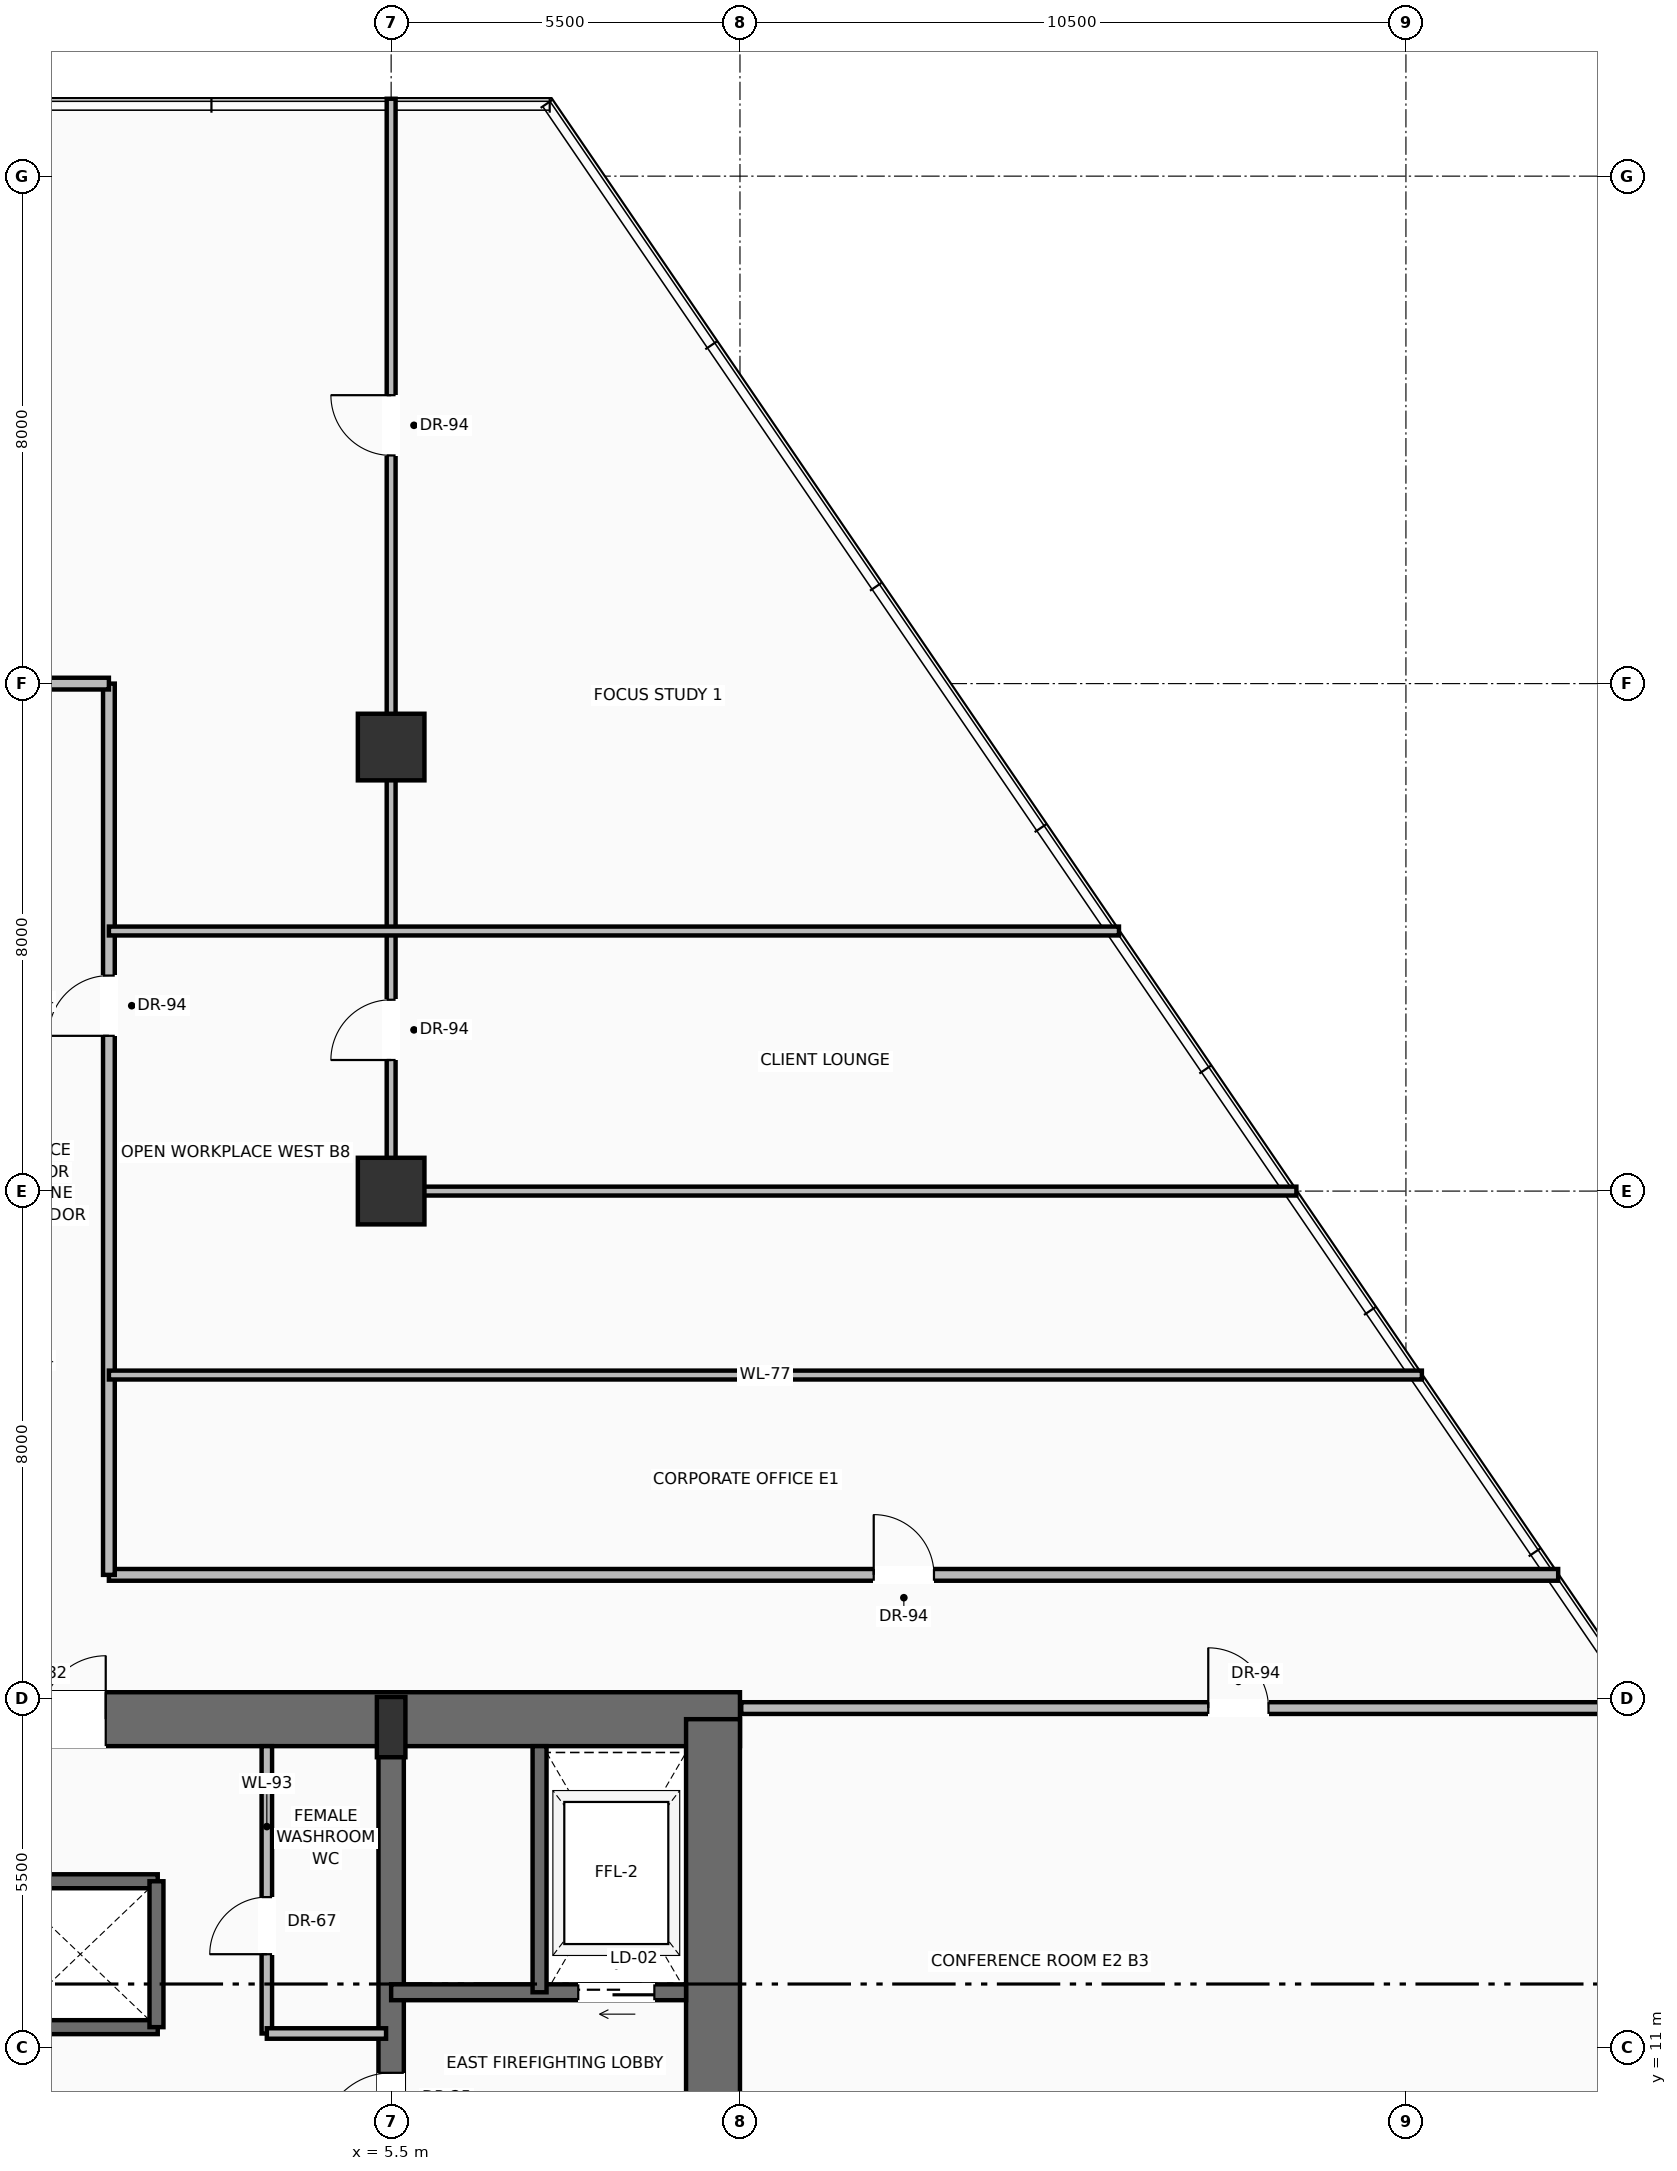
"""IFC4 building model, lengths in metres.
Left out: names, types, materials, properties, quantities, classifications, styles, units other than length and angle.
Written with IfcOpenShell. Run it as: python <this file> out.ifc"""

import sys

from ifc_helpers import new_model, si_unit, direction, frame, frame_2d, origin, origin_2d, place, context, subcontext, project, spatial, rectangle, extrude, source, transform, mapped, element, fill, save


model = new_model("IFC4")
c1 = context("Model", 3, precision=1e-05, world=origin(), true_north=direction((0.0, 1.0)))
c2 = subcontext(c1, "Body", "Model", "MODEL_VIEW")
j1 = project(units=[si_unit("LENGTHUNIT", "METRE"), si_unit("PLANEANGLEUNIT", "RADIAN")], contexts=[c1])
p1 = place(None, origin())
s1 = spatial("IfcSite", under=j1, at=p1, CompositionType="ELEMENT")
p2 = place(p1, origin())
s2 = spatial("IfcBuilding", under=s1, at=p2, CompositionType="ELEMENT")
p3 = place(p2, frame((0.0, 0.0, 27.5)))
s3 = spatial("IfcBuildingStorey", under=s2, at=p3, CompositionType="ELEMENT", Elevation=27.5)
p4 = place(p3, frame((-11.0, 16.175, 0.0), z_axis=(0.0, 0.0, 1.0), x_axis=(1.0, 0.0, 0.0)))
e1 = element("IfcWall", 1, at=p4, inside=s3, PredefinedType="SHEAR", context=c2, shape_type="SweptSolid", body=[
    extrude(rectangle(XDim=22.0, YDim=0.85, at=frame_2d((11.0, 0.0))), origin(), (0.0, 0.0, 1.0), 3.45),
])
p5 = place(p4, frame((3.57, 0.0, 0.0)))
e2 = element("IfcOpeningElement", 2, at=p5, cuts=e1, PredefinedType="OPENING", context=c2, shape_type="SweptSolid", body=[
    extrude(rectangle(XDim=1.3, YDim=2.3, at=frame_2d((0.65, 1.15))), frame((0.0, 0.435, 0.0), z_axis=(0.0, -1.0, 0.0), x_axis=(1.0, 0.0, 0.0)), (0.0, 0.0, 1.0), 0.87),
])
p6 = place(p4, frame((10.0, 0.0, 0.0)))
e3 = element("IfcOpeningElement", 3, at=p6, cuts=e1, PredefinedType="OPENING", context=c2, shape_type="SweptSolid", body=[
    extrude(rectangle(XDim=2.0, YDim=2.4, at=frame_2d((1.0, 1.2))), frame((0.0, 0.435, 0.0), z_axis=(0.0, -1.0, 0.0), x_axis=(1.0, 0.0, 0.0)), (0.0, 0.0, 1.0), 0.87),
])
p7 = place(p3, frame((10.575, 0.425, 0.0), z_axis=(0.0, 0.0, 1.0), x_axis=(0.0, 1.0, 0.0)))
e4 = element("IfcWall", 4, at=p7, inside=s3, PredefinedType="SHEAR", context=c2, shape_type="SweptSolid", body=[
    extrude(rectangle(XDim=15.75, YDim=0.85, at=frame_2d((7.875, 0.0))), origin(), (0.0, 0.0, 1.0), 3.45),
])
p8 = place(p3, frame((5.5, 0.425, 0.0), z_axis=(0.0, 0.0, 1.0), x_axis=(0.0, 1.0, 0.0)))
e5 = element("IfcWall", 5, at=p8, inside=s3, PredefinedType="SHEAR", context=c2, shape_type="SweptSolid", body=[
    extrude(rectangle(XDim=15.75, YDim=0.4, at=frame_2d((7.875, 0.0))), origin(), (0.0, 0.0, 1.0), 3.45),
])
p9 = place(p8, frame((9.075, 0.0, 0.0)))
e6 = element("IfcOpeningElement", 6, at=p9, cuts=e5, PredefinedType="OPENING", context=c2, shape_type="SweptSolid", body=[
    extrude(rectangle(XDim=1.1, YDim=2.2, at=frame_2d((0.55, 1.1))), frame((0.0, 0.21, 0.0), z_axis=(0.0, -1.0, 0.0), x_axis=(1.0, 0.0, 0.0)), (0.0, 0.0, 1.0), 0.42),
])
m1 = source(origin(), c2, "Body", "SweptSolid", [
    extrude(rectangle(XDim=0.45, YDim=0.95, at=origin_2d()), origin(), (0.0, 0.0, 1.0), 3.7),
])
p10 = place(p3, frame((5.5, 16.05, 0.0), z_axis=(0.0, 0.0, 1.0), x_axis=(1.0, 0.0, 0.0)))
e7 = element("IfcColumn", 7, at=p10, inside=s3, PredefinedType="PILASTER", context=c2, shape_type="MappedRepresentation", body=[
    mapped(m1, transform((0.0, 0.0, 0.0), scale=1.0)),
])
m2 = source(origin(), c2, "Body", "SweptSolid", [
    extrude(rectangle(XDim=1.05, YDim=1.05, at=origin_2d()), origin(), (0.0, 0.0, 1.0), 3.7),
])
for number, where, z_axis, x_axis in (
    (8, (5.5, 24.5, 0.0), (0.0, 0.0, 1.0), (1.0, 0.0, 0.0)),
    (9, (5.5, 31.5, 0.0), (0.0, 0.0, 1.0), (1.0, 0.0, 0.0)),
):
    element("IfcColumn", number, at=place(p3, frame(where, z_axis=z_axis, x_axis=x_axis)), inside=s3, PredefinedType="COLUMN", context=c2, shape_type="MappedRepresentation", body=[
        mapped(m2, transform((0.0, 0.0, 0.0), scale=1.0)),
    ])
p11 = place(p3, frame((10.15, 11.87, 0.0), z_axis=(0.0, 0.0, 1.0), x_axis=(-1.0, 0.0, 0.0)))
e10 = element("IfcWall", 10, at=p11, inside=s3, PredefinedType="SOLIDWALL", context=c2, shape_type="SweptSolid", body=[
    extrude(rectangle(XDim=4.65, YDim=0.25, at=frame_2d((2.325, 0.0))), origin(), (0.0, 0.0, 1.0), 3.45),
])
p12 = place(p11, frame((0.5, 0.0, 0.0)))
e11 = element("IfcOpeningElement", 11, at=p12, cuts=e10, PredefinedType="OPENING", context=c2, shape_type="SweptSolid", body=[
    extrude(rectangle(XDim=1.2, YDim=2.25, at=frame_2d((0.6, 1.125))), frame((0.0, 0.135, 0.0), z_axis=(0.0, -1.0, 0.0), x_axis=(1.0, 0.0, 0.0)), (0.0, 0.0, 1.0), 0.27),
])
p13 = place(p3, frame((7.84, 11.87, 0.0), z_axis=(0.0, 0.0, 1.0), x_axis=(0.0, 1.0, 0.0)))
e12 = element("IfcWall", 12, at=p13, inside=s3, PredefinedType="SOLIDWALL", context=c2, shape_type="SweptSolid", body=[
    extrude(rectangle(XDim=3.88, YDim=0.22, at=frame_2d((1.94, 0.0))), origin(), (0.0, 0.0, 1.0), 3.45),
])
for number, where, z_axis, x_axis in (
    (13, (-5.5, 11.32, 0.0), (0.0, 0.0, 1.0), (1.0, 0.0, 0.0)),
    (14, (-5.5, 13.62, 0.0), (0.0, 0.0, 1.0), (1.0, 0.0, 0.0)),
):
    element("IfcWall", number, at=place(p3, frame(where, z_axis=z_axis, x_axis=x_axis)), inside=s3, PredefinedType="SOLIDWALL", context=c2, shape_type="SweptSolid", body=[
        extrude(rectangle(XDim=7.32, YDim=0.22, at=frame_2d((3.66, 0.0))), origin(), (0.0, 0.0, 1.0), 3.45),
    ])
p14 = place(p3, frame((1.8, 11.32, 0.0), z_axis=(0.0, 0.0, 1.0), x_axis=(0.0, 1.0, 0.0)))
e15 = element("IfcWall", 15, at=p14, inside=s3, PredefinedType="SOLIDWALL", context=c2, shape_type="SweptSolid", body=[
    extrude(rectangle(XDim=2.3, YDim=0.22, at=frame_2d((1.15, 0.0))), origin(), (0.0, 0.0, 1.0), 3.45),
])
p15 = place(p3, frame((3.54, 11.22, 0.0), z_axis=(0.0, 0.0, 1.0), x_axis=(0.0, 1.0, 0.0)))
e16 = element("IfcWall", 16, at=p15, inside=s3, PredefinedType="PARTITIONING", context=c2, shape_type="SweptSolid", body=[
    extrude(rectangle(XDim=4.53, YDim=0.165, at=frame_2d((2.265, 0.0))), origin(), (0.0, 0.0, 1.0), 3.442),
])
p16 = place(p15, frame((1.25, 0.0, 0.0)))
e17 = element("IfcOpeningElement", 17, at=p16, cuts=e16, PredefinedType="OPENING", context=c2, shape_type="SweptSolid", body=[
    extrude(rectangle(XDim=0.9, YDim=2.1, at=frame_2d((0.45, 1.05))), frame((0.0, 0.093, 0.0), z_axis=(0.0, -1.0, 0.0), x_axis=(1.0, 0.0, 0.0)), (0.0, 0.0, 1.0), 0.185),
])
p17 = place(p3, frame((3.54, 11.22, 0.0), z_axis=(0.0, 0.0, 1.0), x_axis=(1.0, 0.0, 0.0)))
e18 = element("IfcWall", 18, at=p17, inside=s3, PredefinedType="PARTITIONING", context=c2, shape_type="SweptSolid", body=[
    extrude(rectangle(XDim=1.88, YDim=0.165, at=frame_2d((0.94, 0.0))), origin(), (0.0, 0.0, 1.0), 3.442),
])
p18 = place(p3, frame((11.02, 16.35, 0.0), z_axis=(0.0, 0.0, 1.0), x_axis=(1.0, 0.0, 0.0)))
e19 = element("IfcWall", 19, at=p18, inside=s3, PredefinedType="PARTITIONING", context=c2, shape_type="SweptSolid", body=[
    extrude(rectangle(XDim=14.313, YDim=0.185, at=frame_2d((7.157, 0.0))), origin(), (0.0, 0.0, 1.0), 2.747),
])
p19 = place(p18, frame((7.363, 0.0, 0.0)))
e20 = element("IfcOpeningElement", 20, at=p19, cuts=e19, PredefinedType="OPENING", context=c2, shape_type="SweptSolid", body=[
    extrude(rectangle(XDim=0.95, YDim=2.2, at=frame_2d((0.475, 1.1))), frame((0.0, 0.103, 0.0), z_axis=(0.0, -1.0, 0.0), x_axis=(1.0, 0.0, 0.0)), (0.0, 0.0, 1.0), 0.205),
])
p20 = place(p3, frame((1.05, 18.45, 0.0), z_axis=(0.0, 0.0, 1.0), x_axis=(1.0, 0.0, 0.0)))
e21 = element("IfcWall", 21, at=p20, inside=s3, PredefinedType="PARTITIONING", context=c2, shape_type="SweptSolid", body=[
    extrude(rectangle(XDim=22.85, YDim=0.185, at=frame_2d((11.425, 0.0))), origin(), (0.0, 0.0, 1.0), 2.747),
])
p21 = place(p20, frame((12.059, 0.0, 0.0)))
e22 = element("IfcOpeningElement", 22, at=p21, cuts=e21, PredefinedType="OPENING", context=c2, shape_type="SweptSolid", body=[
    extrude(rectangle(XDim=0.95, YDim=2.2, at=frame_2d((0.475, 1.1))), frame((0.0, 0.103, 0.0), z_axis=(0.0, -1.0, 0.0), x_axis=(1.0, 0.0, 0.0)), (0.0, 0.0, 1.0), 0.205),
])
p22 = place(p3, frame((1.05, 18.45, 0.0), z_axis=(0.0, 0.0, 1.0), x_axis=(0.0, 1.0, 0.0)))
e23 = element("IfcWall", 23, at=p22, inside=s3, PredefinedType="PARTITIONING", context=c2, shape_type="SweptSolid", body=[
    extrude(rectangle(XDim=14.05, YDim=0.185, at=frame_2d((7.025, 0.0))), origin(), (0.0, 0.0, 1.0), 2.747),
])
p23 = place(p22, frame((8.498, 0.0, 0.0)))
e24 = element("IfcOpeningElement", 24, at=p23, cuts=e23, PredefinedType="OPENING", context=c2, shape_type="SweptSolid", body=[
    extrude(rectangle(XDim=0.95, YDim=2.2, at=frame_2d((0.475, 1.1))), frame((0.0, 0.103, 0.0), z_axis=(0.0, -1.0, 0.0), x_axis=(1.0, 0.0, 0.0)), (0.0, 0.0, 1.0), 0.205),
])
p24 = place(p3, frame((-1.05, 32.5, 0.0), z_axis=(0.0, 0.0, 1.0), x_axis=(1.0, 0.0, 0.0)))
e25 = element("IfcWall", 25, at=p24, inside=s3, PredefinedType="PARTITIONING", context=c2, shape_type="SweptSolid", body=[
    extrude(rectangle(XDim=2.1, YDim=0.185, at=frame_2d((1.05, 0.0))), origin(), (0.0, 0.0, 1.0), 3.442),
])
p25 = place(p3, frame((5.5, 24.5, 0.0), z_axis=(0.0, 0.0, 1.0), x_axis=(0.0, 1.0, 0.0)))
e26 = element("IfcWall", 26, at=p25, inside=s3, PredefinedType="PARTITIONING", context=c2, shape_type="SweptSolid", body=[
    extrude(rectangle(XDim=17.22, YDim=0.14, at=frame_2d((8.61, 0.0))), origin(), (0.0, 0.0, 1.0), 2.747),
])
p26 = place(p25, frame((2.066, 0.0, 0.0)))
e27 = element("IfcOpeningElement", 27, at=p26, cuts=e26, PredefinedType="OPENING", context=c2, shape_type="SweptSolid", body=[
    extrude(rectangle(XDim=0.95, YDim=2.2, at=frame_2d((0.475, 1.1))), frame((0.0, 0.08, 0.0), z_axis=(0.0, -1.0, 0.0), x_axis=(1.0, 0.0, 0.0)), (0.0, 0.0, 1.0), 0.16),
])
p27 = place(p25, frame((11.597, 0.0, 0.0)))
e28 = element("IfcOpeningElement", 28, at=p27, cuts=e26, PredefinedType="OPENING", context=c2, shape_type="SweptSolid", body=[
    extrude(rectangle(XDim=0.95, YDim=2.2, at=frame_2d((0.475, 1.1))), frame((0.0, 0.08, 0.0), z_axis=(0.0, -1.0, 0.0), x_axis=(1.0, 0.0, 0.0)), (0.0, 0.0, 1.0), 0.16),
])
p28 = place(p3, frame((5.5, 24.5, 0.0), z_axis=(0.0, 0.0, 1.0), x_axis=(1.0, 0.0, 0.0)))
e29 = element("IfcWall", 29, at=p28, inside=s3, PredefinedType="PARTITIONING", context=c2, shape_type="SweptSolid", body=[
    extrude(rectangle(XDim=14.273, YDim=0.14, at=frame_2d((7.136, 0.0))), origin(), (0.0, 0.0, 1.0), 2.747),
])
p29 = place(p3, frame((1.05, 21.6, 0.0), z_axis=(0.0, 0.0, 1.0), x_axis=(1.0, 0.0, 0.0)))
e30 = element("IfcWall", 30, at=p29, inside=s3, PredefinedType="PARTITIONING", context=c2, shape_type="SweptSolid", body=[
    extrude(rectangle(XDim=20.701, YDim=0.14, at=frame_2d((10.351, 0.0))), origin(), (0.0, 0.0, 1.0), 2.747),
])
p30 = place(p3, frame((1.05, 28.6, 0.0), z_axis=(0.0, 0.0, 1.0), x_axis=(1.0, 0.0, 0.0)))
e31 = element("IfcWall", 31, at=p30, inside=s3, PredefinedType="PARTITIONING", context=c2, shape_type="SweptSolid", body=[
    extrude(rectangle(XDim=15.926, YDim=0.14, at=frame_2d((7.963, 0.0))), origin(), (0.0, 0.0, 1.0), 2.747),
])
m3 = source(origin(), c2, "Body", "SweptSolid", [
    extrude(rectangle(XDim=1.1, YDim=2.2, at=frame_2d((0.55, 1.1))), frame((0.0, 0.025, 0.0), z_axis=(0.0, -1.0, 0.0), x_axis=(1.0, 0.0, 0.0)), (0.0, 0.0, 1.0), 0.05),
])
p31 = place(p9, origin())
e32 = element("IfcDoor", 32, at=p31, inside=s3, OperationType="SINGLE_SWING_LEFT", PredefinedType="DOOR", context=c2, shape_type="MappedRepresentation", body=[
    mapped(m3, transform((0.0, 0.0, 0.0), scale=1.0)),
])
fill(e6, e32)
m4 = source(origin(), c2, "Body", "SweptSolid", [
    extrude(rectangle(XDim=1.2, YDim=2.25, at=frame_2d((0.6, 1.125))), frame((0.0, 0.025, 0.0), z_axis=(0.0, -1.0, 0.0), x_axis=(1.0, 0.0, 0.0)), (0.0, 0.0, 1.0), 0.05),
])
p32 = place(p12, origin())
e33 = element("IfcDoor", 33, at=p32, inside=s3, OperationType="SLIDING_TO_RIGHT", PredefinedType="DOOR", context=c2, shape_type="MappedRepresentation", body=[
    mapped(m4, transform((0.0, 0.0, 0.0), scale=1.0)),
])
fill(e11, e33)
m5 = source(origin(), c2, "Body", "SweptSolid", [
    extrude(rectangle(XDim=2.0, YDim=2.4, at=frame_2d((1.0, 1.2))), frame((0.0, 0.025, 0.0), z_axis=(0.0, -1.0, 0.0), x_axis=(1.0, 0.0, 0.0)), (0.0, 0.0, 1.0), 0.05),
])
p33 = place(p6, origin())
e34 = element("IfcDoor", 34, at=p33, inside=s3, OperationType="DOUBLE_DOOR_SINGLE_SWING", PredefinedType="DOOR", context=c2, shape_type="MappedRepresentation", body=[
    mapped(m5, transform((0.0, 0.0, 0.0), scale=1.0)),
])
fill(e3, e34)
m6 = source(origin(), c2, "Body", "SweptSolid", [
    extrude(rectangle(XDim=0.9, YDim=2.1, at=frame_2d((0.45, 1.05))), frame((0.0, 0.025, 0.0), z_axis=(0.0, -1.0, 0.0), x_axis=(1.0, 0.0, 0.0)), (0.0, 0.0, 1.0), 0.05),
])
p34 = place(p16, origin())
e35 = element("IfcDoor", 35, at=p34, inside=s3, OperationType="SINGLE_SWING_LEFT", PredefinedType="DOOR", context=c2, shape_type="MappedRepresentation", body=[
    mapped(m6, transform((0.0, 0.0, 0.0), scale=1.0)),
])
fill(e17, e35)
m7 = source(origin(), c2, "Body", "SweptSolid", [
    extrude(rectangle(XDim=0.95, YDim=2.2, at=frame_2d((0.475, 1.1))), frame((0.0, 0.025, 0.0), z_axis=(0.0, -1.0, 0.0), x_axis=(1.0, 0.0, 0.0)), (0.0, 0.0, 1.0), 0.05),
])
p35 = place(p19, origin())
e36 = element("IfcDoor", 36, at=p35, inside=s3, OperationType="SINGLE_SWING_LEFT", PredefinedType="DOOR", context=c2, shape_type="MappedRepresentation", body=[
    mapped(m7, transform((0.0, 0.0, 0.0), scale=1.0)),
])
fill(e20, e36)
p36 = place(p21, origin())
e37 = element("IfcDoor", 37, at=p36, inside=s3, OperationType="SINGLE_SWING_LEFT", PredefinedType="DOOR", context=c2, shape_type="MappedRepresentation", body=[
    mapped(m7, transform((0.0, 0.0, 0.0), scale=1.0)),
])
fill(e22, e37)
p37 = place(p23, origin())
e38 = element("IfcDoor", 38, at=p37, inside=s3, OperationType="SINGLE_SWING_LEFT", PredefinedType="DOOR", context=c2, shape_type="MappedRepresentation", body=[
    mapped(m7, transform((0.0, 0.0, 0.0), scale=1.0)),
])
fill(e24, e38)
p38 = place(p26, origin())
e39 = element("IfcDoor", 39, at=p38, inside=s3, OperationType="SINGLE_SWING_LEFT", PredefinedType="DOOR", context=c2, shape_type="MappedRepresentation", body=[
    mapped(m7, transform((0.0, 0.0, 0.0), scale=1.0)),
])
fill(e27, e39)
p39 = place(p27, origin())
e40 = element("IfcDoor", 40, at=p39, inside=s3, OperationType="SINGLE_SWING_RIGHT", PredefinedType="DOOR", context=c2, shape_type="MappedRepresentation", body=[
    mapped(m7, transform((0.0, 0.0, 0.0), scale=1.0)),
])
fill(e28, e40)
save(model, sys.argv[1])
